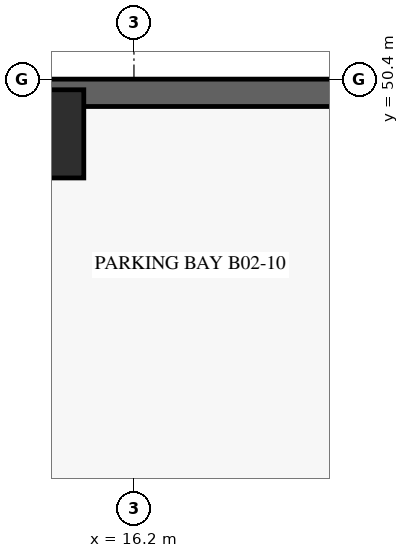
"""IFC4 building model, lengths in metres.
Left out: names, types, materials, properties, quantities, classifications, styles, units other than length and angle.
Written with IfcOpenShell. Run it as: python <this file> out.ifc"""

import sys

from ifc_helpers import new_model, si_unit, direction, frame, frame_2d, origin, origin_2d, place, context, subcontext, project, spatial, rectangle, extrude, source, transform, mapped, element, save


model = new_model("IFC4")
c1 = context("Model", 3, precision=1e-05, world=origin(), true_north=direction((0.0, 1.0)))
c2 = subcontext(c1, "Body", "Model", "MODEL_VIEW")
j1 = project(units=[si_unit("LENGTHUNIT", "METRE"), si_unit("PLANEANGLEUNIT", "RADIAN")], contexts=[c1])
p1 = place(None, origin())
s1 = spatial("IfcSite", under=j1, at=p1, CompositionType="ELEMENT")
p2 = place(p1, origin())
s2 = spatial("IfcBuilding", under=s1, at=p2, CompositionType="ELEMENT")
p3 = place(p2, frame((0.0, 0.0, -7.2)))
s3 = spatial("IfcBuildingStorey", under=s2, at=p3, CompositionType="ELEMENT", Elevation=-7.2)
p4 = place(p3, frame((64.575, 50.175, -0.36), z_axis=(0.0, 0.0, 1.0), x_axis=(-1.0, 0.0, 0.0)))
e1 = element("IfcWall", 1, at=p4, inside=s3, PredefinedType="USERDEFINED", context=c2, shape_type="SweptSolid", body=[
    extrude(rectangle(XDim=64.35, YDim=0.45, at=frame_2d((32.175, 0.0))), origin(), (0.0, 0.0, 1.0), 3.598),
])
m1 = source(origin(), c2, "Body", "SweptSolid", [
    extrude(rectangle(XDim=1.45, YDim=1.45, at=origin_2d()), origin(), (0.0, 0.0, 1.0), 3.6),
])
p5 = place(p3, frame((14.65, 49.5, -0.36), z_axis=(0.0, 0.0, 1.0), x_axis=(1.0, 0.0, 0.0)))
e2 = element("IfcColumn", 2, at=p5, inside=s3, PredefinedType="COLUMN", context=c2, shape_type="MappedRepresentation", body=[
    mapped(m1, transform((0.0, 0.0, 0.0), scale=1.0)),
])
save(model, sys.argv[1])
